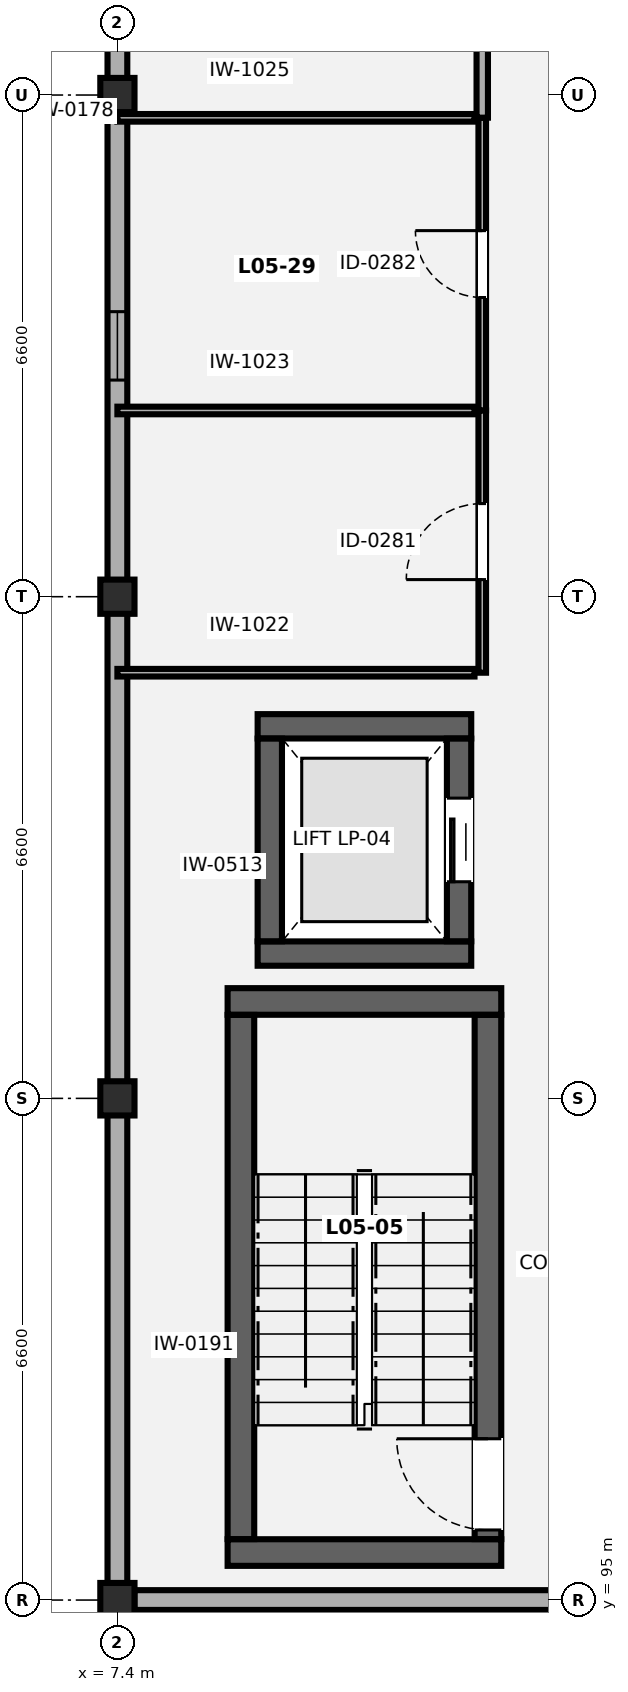
"""IFC4 building model, lengths in metres.
Left out: names, types, materials, properties, quantities, classifications, styles, units other than length and angle.
Written with IfcOpenShell. Run it as: python <this file> out.ifc"""

import sys

from ifc_helpers import new_model, si_unit, direction, frame, frame_2d, origin, origin_2d, place, context, subcontext, project, spatial, rectangle, extrude, element, fill, save


model = new_model("IFC4")
c1 = context("Model", 3, precision=1e-05, world=origin(), true_north=direction((0.0, 1.0)))
c2 = subcontext(c1, "Body", "Model", "MODEL_VIEW")
j1 = project(units=[si_unit("LENGTHUNIT", "METRE"), si_unit("PLANEANGLEUNIT", "RADIAN")], contexts=[c1])
p1 = place(None, origin())
s1 = spatial("IfcSite", under=j1, at=p1, CompositionType="ELEMENT")
p2 = place(p1, origin())
s2 = spatial("IfcBuilding", under=s1, at=p2, CompositionType="ELEMENT")
p3 = place(p2, frame((0.0, 0.0, 21.7)))
s3 = spatial("IfcBuildingStorey", under=s2, at=p3, CompositionType="ELEMENT", Elevation=21.7)
for number, where, z_axis, x_axis in (
    (1, (7.4, 95.0, 0.0), (0.0, 0.0, 1.0), (1.0, 0.0, 0.0)),
    (2, (7.4, 101.6, 0.0), (0.0, 0.0, 1.0), (1.0, 0.0, 0.0)),
    (3, (7.4, 108.2, 0.0), (0.0, 0.0, 1.0), (1.0, 0.0, 0.0)),
    (4, (7.4, 114.8, 0.0), (0.0, 0.0, 1.0), (1.0, 0.0, 0.0)),
):
    element("IfcColumn", number, at=place(p3, frame(where, z_axis=z_axis, x_axis=x_axis)), inside=s3, PredefinedType="PILASTER", context=c2, shape_type="SweptSolid", body=[
        extrude(rectangle(XDim=0.45, YDim=0.45, at=origin_2d()), origin(), (0.0, 0.0, 1.0), 4.2),
    ])
p4 = place(p3, frame((7.4, 95.223, 0.0), z_axis=(0.0, 0.0, 1.0), x_axis=(0.0, 1.0, 0.0)))
e5 = element("IfcWall", 5, at=p4, inside=s3, PredefinedType="SOLIDWALL", context=c2, shape_type="SweptSolid", body=[
    extrude(rectangle(XDim=52.354, YDim=0.26, at=frame_2d((26.177, 0.0))), origin(), (0.0, 0.0, 1.0), 2.885),
])
p5 = place(p4, frame((15.827, 0.0, 0.85)))
e6 = element("IfcOpeningElement", 6, at=p5, cuts=e5, PredefinedType="OPENING", context=c2, shape_type="SweptSolid", body=[
    extrude(rectangle(XDim=0.9, YDim=1.35, at=frame_2d((0.45, 0.675))), frame((0.0, 0.14, 0.0), z_axis=(0.0, -1.0, 0.0), x_axis=(1.0, 0.0, 0.0)), (0.0, 0.0, 1.0), 0.28),
])
p6 = place(p4, frame((29.027, 0.0, 0.85)))
e7 = element("IfcOpeningElement", 7, at=p6, cuts=e5, PredefinedType="OPENING", context=c2, shape_type="SweptSolid", body=[
    extrude(rectangle(XDim=0.9, YDim=1.35, at=frame_2d((0.45, 0.675))), frame((0.0, 0.14, 0.0), z_axis=(0.0, -1.0, 0.0), x_axis=(1.0, 0.0, 0.0)), (0.0, 0.0, 1.0), 0.28),
])
p7 = place(p4, frame((42.227, 0.0, 0.85)))
e8 = element("IfcOpeningElement", 8, at=p7, cuts=e5, PredefinedType="OPENING", context=c2, shape_type="SweptSolid", body=[
    extrude(rectangle(XDim=0.9, YDim=1.35, at=frame_2d((0.45, 0.675))), frame((0.0, 0.14, 0.0), z_axis=(0.0, -1.0, 0.0), x_axis=(1.0, 0.0, 0.0)), (0.0, 0.0, 1.0), 0.28),
])
p8 = place(p3, frame((26.977, 95.0, 0.0), z_axis=(0.0, 0.0, 1.0), x_axis=(-1.0, 0.0, 0.0)))
e9 = element("IfcWall", 9, at=p8, inside=s3, PredefinedType="SOLIDWALL", context=c2, shape_type="SweptSolid", body=[
    extrude(rectangle(XDim=19.354, YDim=0.26, at=frame_2d((9.677, 0.0))), origin(), (0.0, 0.0, 1.0), 2.48),
])
p9 = place(p8, frame((1.577, 0.0, 0.85)))
e10 = element("IfcOpeningElement", 10, at=p9, cuts=e9, PredefinedType="OPENING", context=c2, shape_type="SweptSolid", body=[
    extrude(rectangle(XDim=1.7, YDim=1.4, at=frame_2d((0.85, 0.7))), frame((0.0, 0.14, 0.0), z_axis=(0.0, -1.0, 0.0), x_axis=(1.0, 0.0, 0.0)), (0.0, 0.0, 1.0), 0.28),
])
for number, where, z_axis, x_axis in (
    (11, (8.85, 95.625, 0.0), (0.0, 0.0, 1.0), (1.0, 0.0, 0.0)),
    (12, (8.85, 102.875, 0.0), (0.0, 0.0, 1.0), (1.0, 0.0, 0.0)),
):
    element("IfcWall", number, at=place(p3, frame(where, z_axis=z_axis, x_axis=x_axis)), inside=s3, PredefinedType="SHEAR", context=c2, shape_type="SweptSolid", body=[
        extrude(rectangle(XDim=3.6, YDim=0.35, at=frame_2d((1.8, 0.0))), origin(), (0.0, 0.0, 1.0), 3.9),
    ])
p10 = place(p3, frame((9.025, 95.802, 0.0), z_axis=(0.0, 0.0, 1.0), x_axis=(0.0, 1.0, 0.0)))
e13 = element("IfcWall", 13, at=p10, inside=s3, PredefinedType="SHEAR", context=c2, shape_type="SweptSolid", body=[
    extrude(rectangle(XDim=6.896, YDim=0.35, at=frame_2d((3.448, 0.0))), origin(), (0.0, 0.0, 1.0), 3.9),
])
p11 = place(p3, frame((12.275, 95.802, 0.0), z_axis=(0.0, 0.0, 1.0), x_axis=(0.0, 1.0, 0.0)))
e14 = element("IfcWall", 14, at=p11, inside=s3, PredefinedType="SHEAR", context=c2, shape_type="SweptSolid", body=[
    extrude(rectangle(XDim=6.896, YDim=0.35, at=frame_2d((3.448, 0.0))), origin(), (0.0, 0.0, 1.0), 3.9),
])
p12 = place(p11, frame((0.12, 0.0, 0.0)))
e15 = element("IfcOpeningElement", 15, at=p12, cuts=e14, PredefinedType="OPENING", context=c2, shape_type="SweptSolid", body=[
    extrude(rectangle(XDim=1.2, YDim=2.15, at=frame_2d((0.6, 1.075))), frame((0.0, 0.185, 0.0), z_axis=(0.0, -1.0, 0.0), x_axis=(1.0, 0.0, 0.0)), (0.0, 0.0, 1.0), 0.37),
])
for number, where, z_axis, x_axis in (
    (16, (9.245, 103.505, 0.0), (0.0, 0.0, 1.0), (1.0, 0.0, 0.0)),
    (17, (9.245, 106.495, 0.0), (0.0, 0.0, 1.0), (1.0, 0.0, 0.0)),
):
    element("IfcWall", number, at=place(p3, frame(where, z_axis=z_axis, x_axis=x_axis)), inside=s3, PredefinedType="SHEAR", context=c2, shape_type="SweptSolid", body=[
        extrude(rectangle(XDim=2.81, YDim=0.32, at=frame_2d((1.405, 0.0))), origin(), (0.0, 0.0, 1.0), 3.9),
    ])
p13 = place(p3, frame((9.405, 103.667, 0.0), z_axis=(0.0, 0.0, 1.0), x_axis=(0.0, 1.0, 0.0)))
e18 = element("IfcWall", 18, at=p13, inside=s3, PredefinedType="SHEAR", context=c2, shape_type="SweptSolid", body=[
    extrude(rectangle(XDim=2.666, YDim=0.32, at=frame_2d((1.333, 0.0))), origin(), (0.0, 0.0, 1.0), 3.9),
])
p14 = place(p3, frame((11.895, 103.667, 0.0), z_axis=(0.0, 0.0, 1.0), x_axis=(0.0, 1.0, 0.0)))
e19 = element("IfcWall", 19, at=p14, inside=s3, PredefinedType="SHEAR", context=c2, shape_type="SweptSolid", body=[
    extrude(rectangle(XDim=2.666, YDim=0.32, at=frame_2d((1.333, 0.0))), origin(), (0.0, 0.0, 1.0), 3.9),
])
p15 = place(p14, frame((0.783, 0.0, 0.0)))
e20 = element("IfcOpeningElement", 20, at=p15, cuts=e19, PredefinedType="OPENING", context=c2, shape_type="SweptSolid", body=[
    extrude(rectangle(XDim=1.1, YDim=2.15, at=frame_2d((0.55, 1.075))), frame((0.0, 0.17, 0.0), z_axis=(0.0, -1.0, 0.0), x_axis=(1.0, 0.0, 0.0)), (0.0, 0.0, 1.0), 0.34),
])
for number, where, z_axis, x_axis in (
    (21, (7.4, 107.2, 0.0), (0.0, 0.0, 1.0), (1.0, 0.0, 0.0)),
    (22, (7.4, 110.65, 0.0), (0.0, 0.0, 1.0), (1.0, 0.0, 0.0)),
):
    element("IfcWall", number, at=place(p3, frame(where, z_axis=z_axis, x_axis=x_axis)), inside=s3, PredefinedType="PARTITIONING", context=c2, shape_type="SweptSolid", body=[
        extrude(rectangle(XDim=4.698, YDim=0.1, at=frame_2d((2.349, 0.0))), origin(), (0.0, 0.0, 1.0), 3.9),
    ])
p16 = place(p3, frame((12.2, 107.2, 0.0), z_axis=(0.0, 0.0, 1.0), x_axis=(0.0, 1.0, 0.0)))
e23 = element("IfcWall", 23, at=p16, inside=s3, PredefinedType="PARTITIONING", context=c2, shape_type="SweptSolid", body=[
    extrude(rectangle(XDim=3.45, YDim=0.1, at=frame_2d((1.725, 0.0))), origin(), (0.0, 0.0, 1.0), 3.9),
])
p17 = place(p16, frame((1.225, 0.0, 0.0)))
e24 = element("IfcOpeningElement", 24, at=p17, cuts=e23, PredefinedType="OPENING", context=c2, shape_type="SweptSolid", body=[
    extrude(rectangle(XDim=1.0, YDim=2.1, at=frame_2d((0.5, 1.05))), frame((0.0, 0.06, 0.0), z_axis=(0.0, -1.0, 0.0), x_axis=(1.0, 0.0, 0.0)), (0.0, 0.0, 1.0), 0.12),
])
p18 = place(p3, frame((7.4, 114.5, 0.0), z_axis=(0.0, 0.0, 1.0), x_axis=(1.0, 0.0, 0.0)))
e25 = element("IfcWall", 25, at=p18, inside=s3, PredefinedType="PARTITIONING", context=c2, shape_type="SweptSolid", body=[
    extrude(rectangle(XDim=4.698, YDim=0.1, at=frame_2d((2.349, 0.0))), origin(), (0.0, 0.0, 1.0), 2.435),
])
p19 = place(p3, frame((12.2, 110.652, 0.0), z_axis=(0.0, 0.0, 1.0), x_axis=(0.0, 1.0, 0.0)))
e26 = element("IfcWall", 26, at=p19, inside=s3, PredefinedType="PARTITIONING", context=c2, shape_type="SweptSolid", body=[
    extrude(rectangle(XDim=3.848, YDim=0.1, at=frame_2d((1.924, 0.0))), origin(), (0.0, 0.0, 1.0), 3.9),
])
p20 = place(p19, frame((1.484, 0.0, 0.0)))
e27 = element("IfcOpeningElement", 27, at=p20, cuts=e26, PredefinedType="OPENING", context=c2, shape_type="SweptSolid", body=[
    extrude(rectangle(XDim=0.88, YDim=2.08, at=frame_2d((0.44, 1.04))), frame((0.0, 0.06, 0.0), z_axis=(0.0, -1.0, 0.0), x_axis=(1.0, 0.0, 0.0)), (0.0, 0.0, 1.0), 0.12),
])
p21 = place(p3, frame((12.2, 114.502, 0.0), z_axis=(0.0, 0.0, 1.0), x_axis=(0.0, 1.0, 0.0)))
e28 = element("IfcWall", 28, at=p21, inside=s3, PredefinedType="PARTITIONING", context=c2, shape_type="SweptSolid", body=[
    extrude(rectangle(XDim=13.298, YDim=0.15, at=frame_2d((6.649, 0.0))), origin(), (0.0, 0.0, 1.0), 3.9),
])
p22 = place(p21, frame((5.649, 0.0, 0.0)))
e29 = element("IfcOpeningElement", 29, at=p22, cuts=e28, PredefinedType="OPENING", context=c2, shape_type="SweptSolid", body=[
    extrude(rectangle(XDim=1.3, YDim=2.2, at=frame_2d((0.65, 1.1))), frame((0.0, 0.085, 0.0), z_axis=(0.0, -1.0, 0.0), x_axis=(1.0, 0.0, 0.0)), (0.0, 0.0, 1.0), 0.17),
])
p23 = place(p5, origin())
e30 = element("IfcWindow", 30, at=p23, inside=s3, PartitioningType="SINGLE_PANEL", PredefinedType="WINDOW", context=c2, shape_type="SweptSolid", body=[
    extrude(rectangle(XDim=0.9, YDim=1.35, at=frame_2d((0.45, 0.675))), frame((0.0, 0.03, 0.0), z_axis=(0.0, -1.0, 0.0), x_axis=(1.0, 0.0, 0.0)), (0.0, 0.0, 1.0), 0.06),
])
fill(e6, e30)
p24 = place(p12, origin())
e31 = element("IfcDoor", 31, at=p24, inside=s3, OperationType="SINGLE_SWING_RIGHT", PredefinedType="DOOR", context=c2, shape_type="SweptSolid", body=[
    extrude(rectangle(XDim=1.2, YDim=2.15, at=frame_2d((0.6, 1.075))), frame((0.0, 0.025, 0.0), z_axis=(0.0, -1.0, 0.0), x_axis=(1.0, 0.0, 0.0)), (0.0, 0.0, 1.0), 0.05),
])
fill(e15, e31)
p25 = place(p15, origin())
e32 = element("IfcDoor", 32, at=p25, inside=s3, OperationType="SLIDING_TO_LEFT", PredefinedType="DOOR", context=c2, shape_type="SweptSolid", body=[
    extrude(rectangle(XDim=1.1, YDim=2.15, at=frame_2d((0.55, 1.075))), frame((0.0, 0.025, 0.0), z_axis=(0.0, -1.0, 0.0), x_axis=(1.0, 0.0, 0.0)), (0.0, 0.0, 1.0), 0.05),
])
fill(e20, e32)
p26 = place(p17, origin())
e33 = element("IfcDoor", 33, at=p26, inside=s3, OperationType="SINGLE_SWING_LEFT", PredefinedType="DOOR", context=c2, shape_type="SweptSolid", body=[
    extrude(rectangle(XDim=1.0, YDim=2.1, at=frame_2d((0.5, 1.05))), frame((0.0, 0.025, 0.0), z_axis=(0.0, -1.0, 0.0), x_axis=(1.0, 0.0, 0.0)), (0.0, 0.0, 1.0), 0.05),
])
fill(e24, e33)
p27 = place(p20, origin())
e34 = element("IfcDoor", 34, at=p27, inside=s3, OperationType="SINGLE_SWING_RIGHT", PredefinedType="DOOR", context=c2, shape_type="SweptSolid", body=[
    extrude(rectangle(XDim=0.88, YDim=2.08, at=frame_2d((0.44, 1.04))), frame((0.0, 0.025, 0.0), z_axis=(0.0, -1.0, 0.0), x_axis=(1.0, 0.0, 0.0)), (0.0, 0.0, 1.0), 0.05),
])
fill(e27, e34)
save(model, sys.argv[1])
